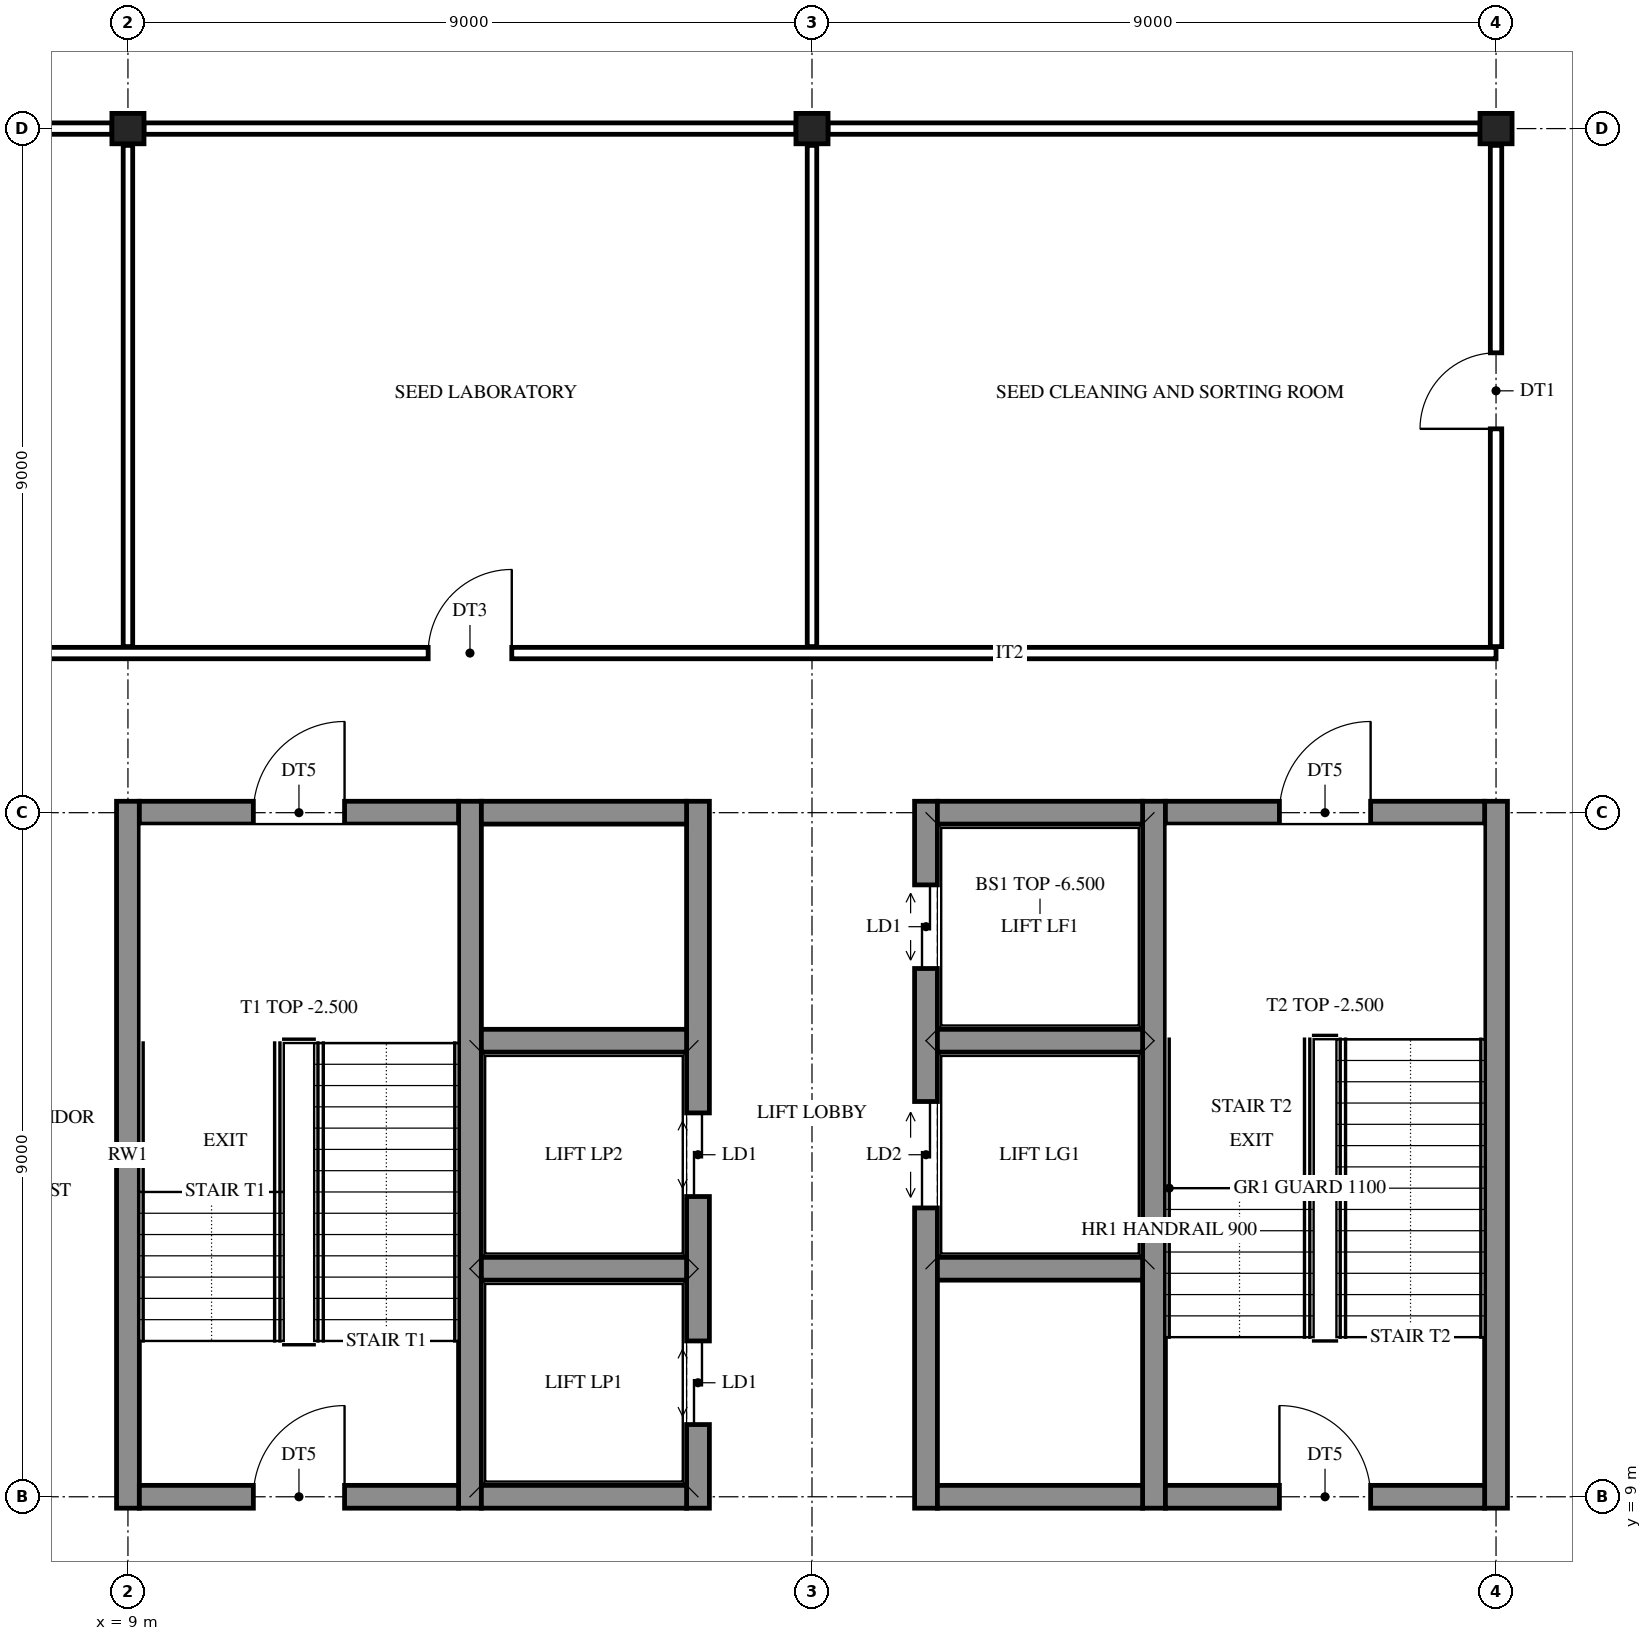
"""IFC4 building model, lengths in metres.
Left out: names, types, materials, properties, quantities, classifications, styles, units other than length and angle.
Written with IfcOpenShell. Run it as: python <this file> out.ifc"""

import sys

from ifc_helpers import new_model, si_unit, direction, frame, frame_2d, origin, origin_2d, place, context, subcontext, project, spatial, rectangle, i_section, extrude, element, fill, save


model = new_model("IFC4")
c1 = context("Model", 3, precision=1e-05, world=origin(), true_north=direction((0.0, 1.0)))
c2 = subcontext(c1, "Body", "Model", "MODEL_VIEW")
j1 = project(units=[si_unit("LENGTHUNIT", "METRE"), si_unit("PLANEANGLEUNIT", "RADIAN")], contexts=[c1])
p1 = place(None, origin())
s1 = spatial("IfcSite", under=j1, at=p1, CompositionType="ELEMENT")
p2 = place(p1, origin())
s2 = spatial("IfcBuilding", under=s1, at=p2, CompositionType="ELEMENT")
p3 = place(p2, frame((0.0, 0.0, -5.0)))
s3 = spatial("IfcBuildingStorey", under=s2, at=p3, CompositionType="ELEMENT", Elevation=-5.0)
for number, where, z_axis, x_axis in (
    (1, (9.0, 27.0, -0.4), (0.0, 0.0, 1.0), (0.0, 1.0, 0.0)),
    (2, (18.0, 27.0, -0.4), (0.0, 0.0, 1.0), (0.0, 1.0, 0.0)),
    (3, (27.0, 27.0, -0.4), (0.0, 0.0, 1.0), (0.0, 1.0, 0.0)),
):
    element("IfcColumn", number, at=place(p3, frame(where, z_axis=z_axis, x_axis=x_axis)), inside=s3, PredefinedType="COLUMN", context=c2, shape_type="SweptSolid", body=[
        extrude(i_section(OverallWidth=0.4, OverallDepth=0.422, WebThickness=0.028, FlangeThickness=0.036, at=origin_2d()), origin(), (0.0, 0.0, 1.0), 5.4),
    ])
for number, where, z_axis, x_axis in (
    (4, (9.0, 8.85, -0.4), (0.0, 0.0, 1.0), (0.0, 1.0, 0.0)),
    (5, (13.5, 8.85, -0.4), (0.0, 0.0, 1.0), (0.0, 1.0, 0.0)),
):
    element("IfcWall", number, at=place(p3, frame(where, z_axis=z_axis, x_axis=x_axis)), inside=s3, PredefinedType="SHEAR", context=c2, shape_type="SweptSolid", body=[
        extrude(rectangle(XDim=9.3, YDim=0.3, at=frame_2d((4.65, 0.0))), origin(), (0.0, 0.0, 1.0), 5.4),
    ])
p4 = place(p3, frame((16.5, 8.85, -0.4), z_axis=(0.0, 0.0, 1.0), x_axis=(0.0, 1.0, 0.0)))
e6 = element("IfcWall", 6, at=p4, inside=s3, PredefinedType="SHEAR", context=c2, shape_type="SweptSolid", body=[
    extrude(rectangle(XDim=9.3, YDim=0.3, at=frame_2d((4.65, 0.0))), origin(), (0.0, 0.0, 1.0), 5.4),
])
p5 = place(p4, frame((1.1, 0.0, 0.4)))
e7 = element("IfcOpeningElement", 7, at=p5, cuts=e6, PredefinedType="OPENING", context=c2, shape_type="SweptSolid", body=[
    extrude(rectangle(XDim=1.1, YDim=2.1, at=frame_2d((0.55, 1.05))), frame((0.0, 0.16, 0.0), z_axis=(0.0, -1.0, 0.0), x_axis=(1.0, 0.0, 0.0)), (0.0, 0.0, 1.0), 0.32),
])
p6 = place(p4, frame((4.1, 0.0, 0.4)))
e8 = element("IfcOpeningElement", 8, at=p6, cuts=e6, PredefinedType="OPENING", context=c2, shape_type="SweptSolid", body=[
    extrude(rectangle(XDim=1.1, YDim=2.1, at=frame_2d((0.55, 1.05))), frame((0.0, 0.16, 0.0), z_axis=(0.0, -1.0, 0.0), x_axis=(1.0, 0.0, 0.0)), (0.0, 0.0, 1.0), 0.32),
])
p7 = place(p3, frame((19.5, 8.85, -0.4), z_axis=(0.0, 0.0, 1.0), x_axis=(0.0, 1.0, 0.0)))
e9 = element("IfcWall", 9, at=p7, inside=s3, PredefinedType="SHEAR", context=c2, shape_type="SweptSolid", body=[
    extrude(rectangle(XDim=9.3, YDim=0.3, at=frame_2d((4.65, 0.0))), origin(), (0.0, 0.0, 1.0), 5.4),
])
p8 = place(p7, frame((3.95, 0.0, 0.4)))
e10 = element("IfcOpeningElement", 10, at=p8, cuts=e9, PredefinedType="OPENING", context=c2, shape_type="SweptSolid", body=[
    extrude(rectangle(XDim=1.4, YDim=2.1, at=frame_2d((0.7, 1.05))), frame((0.0, 0.16, 0.0), z_axis=(0.0, -1.0, 0.0), x_axis=(1.0, 0.0, 0.0)), (0.0, 0.0, 1.0), 0.32),
])
p9 = place(p7, frame((7.1, 0.0, 0.4)))
e11 = element("IfcOpeningElement", 11, at=p9, cuts=e9, PredefinedType="OPENING", context=c2, shape_type="SweptSolid", body=[
    extrude(rectangle(XDim=1.1, YDim=2.1, at=frame_2d((0.55, 1.05))), frame((0.0, 0.16, 0.0), z_axis=(0.0, -1.0, 0.0), x_axis=(1.0, 0.0, 0.0)), (0.0, 0.0, 1.0), 0.32),
])
for number, where, z_axis, x_axis in (
    (12, (22.5, 8.85, -0.4), (0.0, 0.0, 1.0), (0.0, 1.0, 0.0)),
    (13, (27.0, 8.85, -0.4), (0.0, 0.0, 1.0), (0.0, 1.0, 0.0)),
):
    element("IfcWall", number, at=place(p3, frame(where, z_axis=z_axis, x_axis=x_axis)), inside=s3, PredefinedType="SHEAR", context=c2, shape_type="SweptSolid", body=[
        extrude(rectangle(XDim=9.3, YDim=0.3, at=frame_2d((4.65, 0.0))), origin(), (0.0, 0.0, 1.0), 5.4),
    ])
p10 = place(p3, frame((9.15, 9.0, -0.4), z_axis=(0.0, 0.0, 1.0), x_axis=(1.0, 0.0, 0.0)))
e14 = element("IfcWall", 14, at=p10, inside=s3, PredefinedType="SHEAR", context=c2, shape_type="SweptSolid", body=[
    extrude(rectangle(XDim=4.2, YDim=0.3, at=frame_2d((2.1, 0.0))), origin(), (0.0, 0.0, 1.0), 5.4),
])
p11 = place(p10, frame((1.5, 0.0, 0.4)))
e15 = element("IfcOpeningElement", 15, at=p11, cuts=e14, PredefinedType="OPENING", context=c2, shape_type="SweptSolid", body=[
    extrude(rectangle(XDim=1.2, YDim=2.1, at=frame_2d((0.6, 1.05))), frame((0.0, 0.16, 0.0), z_axis=(0.0, -1.0, 0.0), x_axis=(1.0, 0.0, 0.0)), (0.0, 0.0, 1.0), 0.32),
])
for number, where, z_axis, x_axis in (
    (16, (13.65, 9.0, -0.4), (0.0, 0.0, 1.0), (1.0, 0.0, 0.0)),
    (17, (19.65, 9.0, -0.4), (0.0, 0.0, 1.0), (1.0, 0.0, 0.0)),
):
    element("IfcWall", number, at=place(p3, frame(where, z_axis=z_axis, x_axis=x_axis)), inside=s3, PredefinedType="SHEAR", context=c2, shape_type="SweptSolid", body=[
        extrude(rectangle(XDim=2.7, YDim=0.3, at=frame_2d((1.35, 0.0))), origin(), (0.0, 0.0, 1.0), 5.4),
    ])
p12 = place(p3, frame((22.65, 9.0, -0.4), z_axis=(0.0, 0.0, 1.0), x_axis=(1.0, 0.0, 0.0)))
e18 = element("IfcWall", 18, at=p12, inside=s3, PredefinedType="SHEAR", context=c2, shape_type="SweptSolid", body=[
    extrude(rectangle(XDim=4.2, YDim=0.3, at=frame_2d((2.1, 0.0))), origin(), (0.0, 0.0, 1.0), 5.4),
])
p13 = place(p12, frame((1.5, 0.0, 0.4)))
e19 = element("IfcOpeningElement", 19, at=p13, cuts=e18, PredefinedType="OPENING", context=c2, shape_type="SweptSolid", body=[
    extrude(rectangle(XDim=1.2, YDim=2.1, at=frame_2d((0.6, 1.05))), frame((0.0, 0.16, 0.0), z_axis=(0.0, -1.0, 0.0), x_axis=(1.0, 0.0, 0.0)), (0.0, 0.0, 1.0), 0.32),
])
for number, where, z_axis, x_axis in (
    (20, (13.65, 12.0, -0.4), (0.0, 0.0, 1.0), (1.0, 0.0, 0.0)),
    (21, (19.65, 12.0, -0.4), (0.0, 0.0, 1.0), (1.0, 0.0, 0.0)),
    (22, (13.65, 15.0, -0.4), (0.0, 0.0, 1.0), (1.0, 0.0, 0.0)),
    (23, (19.65, 15.0, -0.4), (0.0, 0.0, 1.0), (1.0, 0.0, 0.0)),
):
    element("IfcWall", number, at=place(p3, frame(where, z_axis=z_axis, x_axis=x_axis)), inside=s3, PredefinedType="SHEAR", context=c2, shape_type="SweptSolid", body=[
        extrude(rectangle(XDim=2.7, YDim=0.3, at=frame_2d((1.35, 0.0))), origin(), (0.0, 0.0, 1.0), 5.4),
    ])
p14 = place(p3, frame((9.15, 18.0, -0.4), z_axis=(0.0, 0.0, 1.0), x_axis=(1.0, 0.0, 0.0)))
e24 = element("IfcWall", 24, at=p14, inside=s3, PredefinedType="SHEAR", context=c2, shape_type="SweptSolid", body=[
    extrude(rectangle(XDim=4.2, YDim=0.3, at=frame_2d((2.1, 0.0))), origin(), (0.0, 0.0, 1.0), 5.4),
])
p15 = place(p14, frame((1.5, 0.0, 0.4)))
e25 = element("IfcOpeningElement", 25, at=p15, cuts=e24, PredefinedType="OPENING", context=c2, shape_type="SweptSolid", body=[
    extrude(rectangle(XDim=1.2, YDim=2.1, at=frame_2d((0.6, 1.05))), frame((0.0, 0.16, 0.0), z_axis=(0.0, -1.0, 0.0), x_axis=(1.0, 0.0, 0.0)), (0.0, 0.0, 1.0), 0.32),
])
for number, where, z_axis, x_axis in (
    (26, (13.65, 18.0, -0.4), (0.0, 0.0, 1.0), (1.0, 0.0, 0.0)),
    (27, (19.65, 18.0, -0.4), (0.0, 0.0, 1.0), (1.0, 0.0, 0.0)),
):
    element("IfcWall", number, at=place(p3, frame(where, z_axis=z_axis, x_axis=x_axis)), inside=s3, PredefinedType="SHEAR", context=c2, shape_type="SweptSolid", body=[
        extrude(rectangle(XDim=2.7, YDim=0.3, at=frame_2d((1.35, 0.0))), origin(), (0.0, 0.0, 1.0), 5.4),
    ])
p16 = place(p3, frame((22.65, 18.0, -0.4), z_axis=(0.0, 0.0, 1.0), x_axis=(1.0, 0.0, 0.0)))
e28 = element("IfcWall", 28, at=p16, inside=s3, PredefinedType="SHEAR", context=c2, shape_type="SweptSolid", body=[
    extrude(rectangle(XDim=4.2, YDim=0.3, at=frame_2d((2.1, 0.0))), origin(), (0.0, 0.0, 1.0), 5.4),
])
p17 = place(p16, frame((1.5, 0.0, 0.4)))
e29 = element("IfcOpeningElement", 29, at=p17, cuts=e28, PredefinedType="OPENING", context=c2, shape_type="SweptSolid", body=[
    extrude(rectangle(XDim=1.2, YDim=2.1, at=frame_2d((0.6, 1.05))), frame((0.0, 0.16, 0.0), z_axis=(0.0, -1.0, 0.0), x_axis=(1.0, 0.0, 0.0)), (0.0, 0.0, 1.0), 0.32),
])
for number, where, z_axis, x_axis in (
    (30, (9.0, 20.185, 0.0), (0.0, 0.0, 1.0), (0.0, 1.0, 0.0)),
    (31, (18.0, 20.185, 0.0), (0.0, 0.0, 1.0), (0.0, 1.0, 0.0)),
):
    element("IfcWall", number, at=place(p3, frame(where, z_axis=z_axis, x_axis=x_axis)), inside=s3, PredefinedType="PARTITIONING", context=c2, shape_type="SweptSolid", body=[
        extrude(rectangle(XDim=6.594, YDim=0.125, at=frame_2d((3.297, 0.0))), origin(), (0.0, 0.0, 1.0), 4.267),
    ])
p18 = place(p3, frame((27.0, 20.185, 0.0), z_axis=(0.0, 0.0, 1.0), x_axis=(0.0, 1.0, 0.0)))
e32 = element("IfcWall", 32, at=p18, inside=s3, PredefinedType="PARTITIONING", context=c2, shape_type="SweptSolid", body=[
    extrude(rectangle(XDim=6.594, YDim=0.15, at=frame_2d((3.297, 0.0))), origin(), (0.0, 0.0, 1.0), 4.267),
])
p19 = place(p18, frame((2.865, 0.0, 0.0)))
e33 = element("IfcOpeningElement", 33, at=p19, cuts=e32, PredefinedType="OPENING", context=c2, shape_type="SweptSolid", body=[
    extrude(rectangle(XDim=1.0, YDim=2.1, at=frame_2d((0.5, 1.05))), frame((0.0, 0.085, 0.0), z_axis=(0.0, -1.0, 0.0), x_axis=(1.0, 0.0, 0.0)), (0.0, 0.0, 1.0), 0.17),
])
p20 = place(p3, frame((6.9, 20.1, 0.0), z_axis=(0.0, 0.0, 1.0), x_axis=(1.0, 0.0, 0.0)))
e34 = element("IfcWall", 34, at=p20, inside=s3, PredefinedType="PARTITIONING", context=c2, shape_type="SweptSolid", body=[
    extrude(rectangle(XDim=20.1, YDim=0.15, at=frame_2d((10.05, 0.0))), origin(), (0.0, 0.0, 1.0), 4.267),
])
p21 = place(p20, frame((6.05, 0.0, 0.0)))
e35 = element("IfcOpeningElement", 35, at=p21, cuts=e34, PredefinedType="OPENING", context=c2, shape_type="SweptSolid", body=[
    extrude(rectangle(XDim=1.1, YDim=2.1, at=frame_2d((0.55, 1.05))), frame((0.0, 0.085, 0.0), z_axis=(0.0, -1.0, 0.0), x_axis=(1.0, 0.0, 0.0)), (0.0, 0.0, 1.0), 0.17),
])
p22 = place(p3, frame((0.21, 27.0, 0.0), z_axis=(0.0, 0.0, 1.0), x_axis=(1.0, 0.0, 0.0)))
e36 = element("IfcWall", 36, at=p22, inside=s3, PredefinedType="PARTITIONING", context=c2, shape_type="SweptSolid", body=[
    extrude(rectangle(XDim=8.58, YDim=0.15, at=frame_2d((4.29, 0.0))), origin(), (0.0, 0.0, 1.0), 4.272),
])
p23 = place(p22, frame((3.79, 0.0, 0.0)))
e37 = element("IfcOpeningElement", 37, at=p23, cuts=e36, PredefinedType="OPENING", context=c2, shape_type="SweptSolid", body=[
    extrude(rectangle(XDim=1.0, YDim=2.1, at=frame_2d((0.5, 1.05))), frame((0.0, 0.085, 0.0), z_axis=(0.0, -1.0, 0.0), x_axis=(1.0, 0.0, 0.0)), (0.0, 0.0, 1.0), 0.17),
])
for number, where, z_axis, x_axis in (
    (38, (9.21, 27.0, 0.0), (0.0, 0.0, 1.0), (1.0, 0.0, 0.0)),
    (39, (18.21, 27.0, 0.0), (0.0, 0.0, 1.0), (1.0, 0.0, 0.0)),
):
    element("IfcWall", number, at=place(p3, frame(where, z_axis=z_axis, x_axis=x_axis)), inside=s3, PredefinedType="PARTITIONING", context=c2, shape_type="SweptSolid", body=[
        extrude(rectangle(XDim=8.58, YDim=0.15, at=frame_2d((4.29, 0.0))), origin(), (0.0, 0.0, 1.0), 4.272),
    ])
p24 = place(p11, origin())
e40 = element("IfcDoor", 40, at=p24, inside=s3, OperationType="SINGLE_SWING_RIGHT", PredefinedType="DOOR", context=c2, shape_type="SweptSolid", body=[
    extrude(rectangle(XDim=1.2, YDim=2.1, at=frame_2d((0.6, 1.05))), frame((0.0, 0.025, 0.0), z_axis=(0.0, -1.0, 0.0), x_axis=(1.0, 0.0, 0.0)), (0.0, 0.0, 1.0), 0.05),
])
fill(e15, e40)
p25 = place(p13, origin())
e41 = element("IfcDoor", 41, at=p25, inside=s3, OperationType="SINGLE_SWING_LEFT", PredefinedType="DOOR", context=c2, shape_type="SweptSolid", body=[
    extrude(rectangle(XDim=1.2, YDim=2.1, at=frame_2d((0.6, 1.05))), frame((0.0, 0.025, 0.0), z_axis=(0.0, -1.0, 0.0), x_axis=(1.0, 0.0, 0.0)), (0.0, 0.0, 1.0), 0.05),
])
fill(e19, e41)
p26 = place(p21, origin())
e42 = element("IfcDoor", 42, at=p26, inside=s3, OperationType="SINGLE_SWING_RIGHT", PredefinedType="DOOR", context=c2, shape_type="SweptSolid", body=[
    extrude(rectangle(XDim=1.1, YDim=2.1, at=frame_2d((0.55, 1.05))), frame((0.0, 0.025, 0.0), z_axis=(0.0, -1.0, 0.0), x_axis=(1.0, 0.0, 0.0)), (0.0, 0.0, 1.0), 0.05),
])
fill(e35, e42)
p27 = place(p19, origin())
e43 = element("IfcDoor", 43, at=p27, inside=s3, OperationType="SINGLE_SWING_LEFT", PredefinedType="DOOR", context=c2, shape_type="SweptSolid", body=[
    extrude(rectangle(XDim=1.0, YDim=2.1, at=frame_2d((0.5, 1.05))), frame((0.0, 0.025, 0.0), z_axis=(0.0, -1.0, 0.0), x_axis=(1.0, 0.0, 0.0)), (0.0, 0.0, 1.0), 0.05),
])
fill(e33, e43)
p28 = place(p15, frame((1.2, 0.0, 0.0), z_axis=(0.0, 0.0, 1.0), x_axis=(-1.0, 0.0, 0.0)))
e44 = element("IfcDoor", 44, at=p28, inside=s3, OperationType="SINGLE_SWING_RIGHT", PredefinedType="DOOR", context=c2, shape_type="SweptSolid", body=[
    extrude(rectangle(XDim=1.2, YDim=2.1, at=frame_2d((0.6, 1.05))), frame((0.0, 0.025, 0.0), z_axis=(0.0, -1.0, 0.0), x_axis=(1.0, 0.0, 0.0)), (0.0, 0.0, 1.0), 0.05),
])
fill(e25, e44)
p29 = place(p17, frame((1.2, 0.0, 0.0), z_axis=(0.0, 0.0, 1.0), x_axis=(-1.0, 0.0, 0.0)))
e45 = element("IfcDoor", 45, at=p29, inside=s3, OperationType="SINGLE_SWING_RIGHT", PredefinedType="DOOR", context=c2, shape_type="SweptSolid", body=[
    extrude(rectangle(XDim=1.2, YDim=2.1, at=frame_2d((0.6, 1.05))), frame((0.0, 0.025, 0.0), z_axis=(0.0, -1.0, 0.0), x_axis=(1.0, 0.0, 0.0)), (0.0, 0.0, 1.0), 0.05),
])
fill(e29, e45)
p30 = place(p5, origin())
e46 = element("IfcDoor", 46, at=p30, inside=s3, OperationType="DOUBLE_DOOR_SLIDING", PredefinedType="DOOR", context=c2, shape_type="SweptSolid", body=[
    extrude(rectangle(XDim=1.1, YDim=2.1, at=frame_2d((0.55, 1.05))), frame((0.0, 0.025, 0.0), z_axis=(0.0, -1.0, 0.0), x_axis=(1.0, 0.0, 0.0)), (0.0, 0.0, 1.0), 0.05),
])
fill(e7, e46)
p31 = place(p6, origin())
e47 = element("IfcDoor", 47, at=p31, inside=s3, OperationType="DOUBLE_DOOR_SLIDING", PredefinedType="DOOR", context=c2, shape_type="SweptSolid", body=[
    extrude(rectangle(XDim=1.1, YDim=2.1, at=frame_2d((0.55, 1.05))), frame((0.0, 0.025, 0.0), z_axis=(0.0, -1.0, 0.0), x_axis=(1.0, 0.0, 0.0)), (0.0, 0.0, 1.0), 0.05),
])
fill(e8, e47)
p32 = place(p8, origin())
e48 = element("IfcDoor", 48, at=p32, inside=s3, OperationType="DOUBLE_DOOR_SLIDING", PredefinedType="DOOR", context=c2, shape_type="SweptSolid", body=[
    extrude(rectangle(XDim=1.4, YDim=2.1, at=frame_2d((0.7, 1.05))), frame((0.0, 0.025, 0.0), z_axis=(0.0, -1.0, 0.0), x_axis=(1.0, 0.0, 0.0)), (0.0, 0.0, 1.0), 0.05),
])
fill(e10, e48)
p33 = place(p9, origin())
e49 = element("IfcDoor", 49, at=p33, inside=s3, OperationType="DOUBLE_DOOR_SLIDING", PredefinedType="DOOR", context=c2, shape_type="SweptSolid", body=[
    extrude(rectangle(XDim=1.1, YDim=2.1, at=frame_2d((0.55, 1.05))), frame((0.0, 0.025, 0.0), z_axis=(0.0, -1.0, 0.0), x_axis=(1.0, 0.0, 0.0)), (0.0, 0.0, 1.0), 0.05),
])
fill(e11, e49)
save(model, sys.argv[1])
